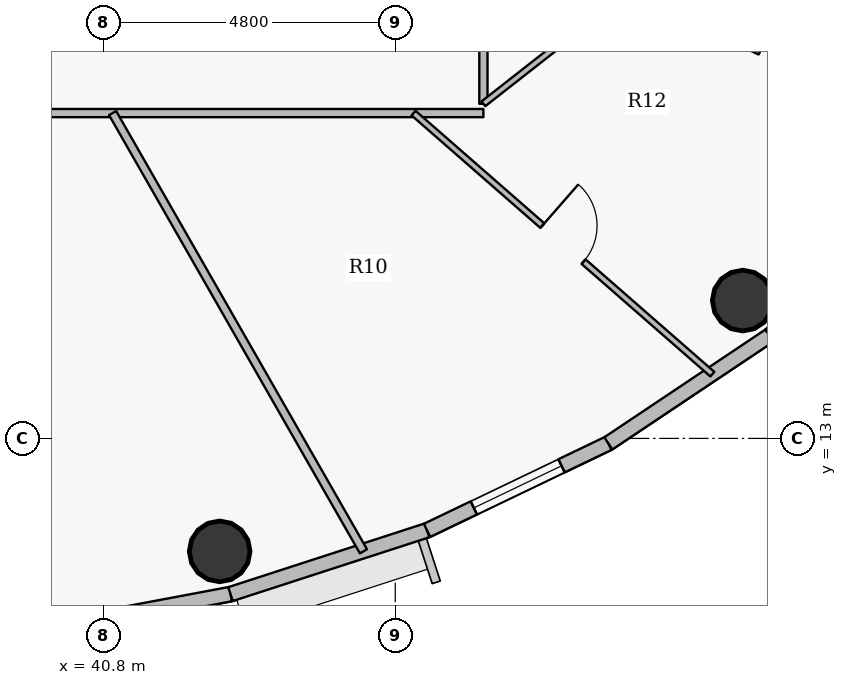
"""IFC4 building model, lengths in metres.
Left out: names, types, materials, properties, quantities, classifications, styles, units other than length and angle.
Written with IfcOpenShell. Run it as: python <this file> out.ifc"""

import sys

from ifc_helpers import new_model, si_unit, direction, frame, frame_2d, origin, origin_2d, place, context, subcontext, project, spatial, rectangle, hollow_circle, extrude, source, transform, mapped, element, fill, save


model = new_model("IFC4")
c1 = context("Model", 3, precision=1e-05, world=origin(), true_north=direction((0.0, 1.0)))
c2 = subcontext(c1, "Body", "Model", "MODEL_VIEW")
j1 = project(units=[si_unit("LENGTHUNIT", "METRE"), si_unit("PLANEANGLEUNIT", "RADIAN")], contexts=[c1])
p1 = place(None, origin())
s1 = spatial("IfcSite", under=j1, at=p1, CompositionType="ELEMENT")
p2 = place(p1, origin())
s2 = spatial("IfcBuilding", under=s1, at=p2, CompositionType="ELEMENT")
p3 = place(p2, frame((0.0, 0.0, 276.75)))
s3 = spatial("IfcBuildingStorey", under=s2, at=p3, CompositionType="ELEMENT", Elevation=276.75)
for number, where, z_axis, x_axis in (
    (1, (42.712, 11.142, 0.0), (0.0, 0.0, 1.0), (1.0, 0.0, 0.0)),
    (2, (51.315, 15.267, 0.0), (0.0, 0.0, 1.0), (1.0, 0.0, 0.0)),
):
    element("IfcColumn", number, at=place(p3, frame(where, z_axis=z_axis, x_axis=x_axis)), inside=s3, PredefinedType="COLUMN", context=c2, shape_type="SweptSolid", body=[
        extrude(hollow_circle(Radius=0.5, WallThickness=0.032, at=origin_2d()), origin(), (0.0, 0.0, 1.0), 3.75),
    ])
p4 = place(p3, frame((42.891, 10.44, 0.0), z_axis=(0.0, 0.0, 1.0), x_axis=(-0.982782655757, -0.184765395959, 0.0)))
e3 = element("IfcWall", 3, at=p4, inside=s3, PredefinedType="SOLIDWALL", context=c2, shape_type="SweptSolid", body=[
    extrude(rectangle(XDim=3.462, YDim=0.24, at=frame_2d((1.731, 0.0))), origin(), (0.0, 0.0, 1.0), 3.5),
])
p5 = place(p3, frame((46.123, 11.488, 0.0), z_axis=(0.0, 0.0, 1.0), x_axis=(-0.95123136723, -0.308478339592, 0.0)))
e4 = element("IfcWall", 4, at=p5, inside=s3, PredefinedType="SOLIDWALL", context=c2, shape_type="SweptSolid", body=[
    extrude(rectangle(XDim=3.398, YDim=0.24, at=frame_2d((1.699, 0.0))), origin(), (0.0, 0.0, 1.0), 3.5),
])
p6 = place(p3, frame((49.104, 12.918, 0.0), z_axis=(0.0, 0.0, 1.0), x_axis=(-0.901573741254, -0.43262546051, 0.0)))
e5 = element("IfcWall", 5, at=p6, inside=s3, PredefinedType="SOLIDWALL", context=c2, shape_type="SweptSolid", body=[
    extrude(rectangle(XDim=3.307, YDim=0.24, at=frame_2d((1.653, 0.0))), origin(), (0.0, 0.0, 1.0), 3.5),
])
p7 = place(p6, frame((0.854, 0.0, 0.9)))
e6 = element("IfcOpeningElement", 6, at=p7, cuts=e5, PredefinedType="OPENING", context=c2, shape_type="SweptSolid", body=[
    extrude(rectangle(XDim=1.6, YDim=1.75, at=origin_2d()), frame((0.8, 0.13, 0.875), z_axis=(0.0, -1.0, 0.0), x_axis=(1.0, 0.0, 0.0)), (0.0, 0.0, 1.0), 0.26),
])
p8 = place(p3, frame((51.762, 14.696, 0.0), z_axis=(0.0, 0.0, 1.0), x_axis=(-0.831250592635, -0.55589787933, 0.0)))
e7 = element("IfcWall", 7, at=p8, inside=s3, PredefinedType="SOLIDWALL", context=c2, shape_type="SweptSolid", body=[
    extrude(rectangle(XDim=3.197, YDim=0.24, at=frame_2d((1.599, 0.0))), origin(), (0.0, 0.0, 1.0), 3.5),
])
p9 = place(p3, frame((54.03, 16.775, 0.0), z_axis=(0.0, 0.0, 1.0), x_axis=(-0.737068506972, -0.675818034703, 0.0)))
e8 = element("IfcWall", 8, at=p9, inside=s3, PredefinedType="SOLIDWALL", context=c2, shape_type="SweptSolid", body=[
    extrude(rectangle(XDim=3.077, YDim=0.24, at=frame_2d((1.539, 0.0))), origin(), (0.0, 0.0, 1.0), 3.5),
])
p10 = place(p3, frame((36.95, 18.35, 0.0), z_axis=(0.0, 0.0, 1.0), x_axis=(1.0, 0.0, 0.0)))
e9 = element("IfcWall", 9, at=p10, inside=s3, PredefinedType="PARTITIONING", context=c2, shape_type="SweptSolid", body=[
    extrude(rectangle(XDim=10.1, YDim=0.135, at=frame_2d((5.05, 0.0))), origin(), (0.0, 0.0, 1.0), 3.035),
])
p11 = place(p10, frame((1.521, 0.0, 0.0)))
e10 = element("IfcOpeningElement", 10, at=p11, cuts=e9, PredefinedType="OPENING", context=c2, shape_type="SweptSolid", body=[
    extrude(rectangle(XDim=1.0, YDim=2.15, at=origin_2d()), frame((0.5, 0.078, 1.075), z_axis=(0.0, -1.0, 0.0), x_axis=(1.0, 0.0, 0.0)), (0.0, 0.0, 1.0), 0.155),
])
p12 = place(p3, frame((40.952, 18.35, 0.0), z_axis=(0.0, 0.0, 1.0), x_axis=(0.496803688517, -0.867862947173, 0.0)))
e11 = element("IfcWall", 11, at=p12, inside=s3, PredefinedType="PARTITIONING", context=c2, shape_type="SweptSolid", body=[
    extrude(rectangle(XDim=8.304, YDim=0.135, at=frame_2d((4.152, 0.0))), origin(), (0.0, 0.0, 1.0), 2.985),
])
p13 = place(p3, frame((45.901, 18.35, 0.0), z_axis=(0.0, 0.0, 1.0), x_axis=(0.753056223084, -0.657956172457, 0.0)))
e12 = element("IfcWall", 12, at=p13, inside=s3, PredefinedType="PARTITIONING", context=c2, shape_type="SweptSolid", body=[
    extrude(rectangle(XDim=6.526, YDim=0.1, at=frame_2d((3.263, 0.0))), origin(), (0.0, 0.0, 1.0), 2.985),
])
p14 = place(p13, frame((2.813, 0.0, 0.0)))
e13 = element("IfcOpeningElement", 13, at=p14, cuts=e12, PredefinedType="OPENING", context=c2, shape_type="SweptSolid", body=[
    extrude(rectangle(XDim=0.9, YDim=2.1, at=origin_2d()), frame((0.45, 0.06, 1.05), z_axis=(0.0, -1.0, 0.0), x_axis=(1.0, 0.0, 0.0)), (0.0, 0.0, 1.0), 0.12),
])
p15 = place(p3, frame((47.05, 18.503, 0.0), z_axis=(0.0, 0.0, 1.0), x_axis=(0.0, 1.0, 0.0)))
e14 = element("IfcWall", 14, at=p15, inside=s3, PredefinedType="PARTITIONING", context=c2, shape_type="SweptSolid", body=[
    extrude(rectangle(XDim=17.147, YDim=0.135, at=frame_2d((8.574, 0.0))), origin(), (0.0, 0.0, 1.0), 3.035),
])
p16 = place(p15, frame((4.545, 0.0, 0.0)))
e15 = element("IfcOpeningElement", 15, at=p16, cuts=e14, PredefinedType="OPENING", context=c2, shape_type="SweptSolid", body=[
    extrude(rectangle(XDim=1.0, YDim=2.15, at=origin_2d()), frame((0.5, 0.078, 1.075), z_axis=(0.0, -1.0, 0.0), x_axis=(1.0, 0.0, 0.0)), (0.0, 0.0, 1.0), 0.155),
])
p17 = place(p3, frame((47.05, 18.503, 0.0), z_axis=(0.0, 0.0, 1.0), x_axis=(0.787328855274, 0.616533270516, 0.0)))
e16 = element("IfcWall", 16, at=p17, inside=s3, PredefinedType="PARTITIONING", context=c2, shape_type="SweptSolid", body=[
    extrude(rectangle(XDim=2.077, YDim=0.1, at=frame_2d((1.039, 0.0))), origin(), (0.0, 0.0, 1.0), 3.035),
])
p18 = place(p3, frame((49.179, 20.542, 0.0), z_axis=(0.0, 0.0, 1.0), x_axis=(0.89799659679, -0.440002400167, 0.0)))
e17 = element("IfcWall", 17, at=p18, inside=s3, PredefinedType="PARTITIONING", context=c2, shape_type="SweptSolid", body=[
    extrude(rectangle(XDim=6.283, YDim=0.1, at=frame_2d((3.141, 0.0))), origin(), (0.0, 0.0, 1.0), 2.985),
])
p19 = place(p18, frame((2.691, 0.0, 0.0)))
e18 = element("IfcOpeningElement", 18, at=p19, cuts=e17, PredefinedType="OPENING", context=c2, shape_type="SweptSolid", body=[
    extrude(rectangle(XDim=0.9, YDim=2.1, at=origin_2d()), frame((0.45, 0.06, 1.05), z_axis=(0.0, -1.0, 0.0), x_axis=(1.0, 0.0, 0.0)), (0.0, 0.0, 1.0), 0.12),
])
m1 = source(origin(), c2, "Body", "SweptSolid", [
    extrude(rectangle(XDim=1.6, YDim=1.75, at=origin_2d()), frame((0.8, 0.03, 0.875), z_axis=(0.0, -1.0, 0.0), x_axis=(1.0, 0.0, 0.0)), (0.0, 0.0, 1.0), 0.06),
])
p20 = place(p7, origin())
e19 = element("IfcWindow", 19, at=p20, inside=s3, PartitioningType="DOUBLE_PANEL_VERTICAL", PredefinedType="WINDOW", context=c2, shape_type="MappedRepresentation", body=[
    mapped(m1, transform((0.0, 0.0, 0.0), x_axis=(1.0, 0.0, 0.0), y_axis=(0.0, 1.0, 0.0), z_axis=(0.0, 0.0, 1.0), scale=1.0)),
])
fill(e6, e19)
m2 = source(origin(), c2, "Body", "SweptSolid", [
    extrude(rectangle(XDim=0.9, YDim=2.1, at=origin_2d()), frame((0.45, 0.025, 1.05), z_axis=(0.0, -1.0, 0.0), x_axis=(1.0, 0.0, 0.0)), (0.0, 0.0, 1.0), 0.05),
])
p21 = place(p19, origin())
e20 = element("IfcDoor", 20, at=p21, inside=s3, OperationType="SINGLE_SWING_RIGHT", PredefinedType="DOOR", context=c2, shape_type="MappedRepresentation", body=[
    mapped(m2, transform((0.0, 0.0, 0.0), x_axis=(1.0, 0.0, 0.0), y_axis=(0.0, 1.0, 0.0), z_axis=(0.0, 0.0, 1.0), scale=1.0)),
])
fill(e18, e20)
p22 = place(p14, origin())
e21 = element("IfcDoor", 21, at=p22, inside=s3, OperationType="SINGLE_SWING_LEFT", PredefinedType="DOOR", context=c2, shape_type="MappedRepresentation", body=[
    mapped(m2, transform((0.0, 0.0, 0.0), x_axis=(1.0, 0.0, 0.0), y_axis=(0.0, 1.0, 0.0), z_axis=(0.0, 0.0, 1.0), scale=1.0)),
])
fill(e13, e21)
save(model, sys.argv[1])
